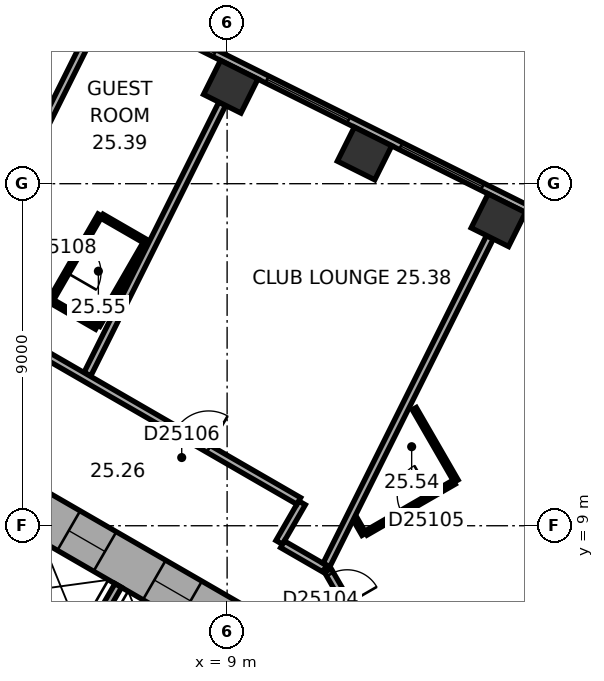
"""IFC4 building model, lengths in metres.
Left out: names, types, materials, properties, quantities, classifications, styles, units other than length and angle.
Written with IfcOpenShell. Run it as: python <this file> out.ifc"""

import sys

from ifc_helpers import new_model, si_unit, direction, frame, frame_2d, origin, origin_2d, place, context, subcontext, project, spatial, rectangle, extrude, element, fill, save


model = new_model("IFC4")
c1 = context("Model", 3, precision=1e-05, world=origin(), true_north=direction((0.0, 1.0)))
c2 = subcontext(c1, "Body", "Model", "MODEL_VIEW")
j1 = project(units=[si_unit("LENGTHUNIT", "METRE"), si_unit("PLANEANGLEUNIT", "RADIAN")], contexts=[c1])
p1 = place(None, origin())
s1 = spatial("IfcSite", under=j1, at=p1, CompositionType="ELEMENT")
p2 = place(p1, origin())
s2 = spatial("IfcBuilding", under=s1, at=p2, CompositionType="ELEMENT")
p3 = place(p2, frame((0.0, 0.0, 106.7)))
s3 = spatial("IfcBuildingStorey", under=s2, at=p3, CompositionType="ELEMENT", Elevation=106.7)
for number, where, z_axis, x_axis in (
    (1, (16.138, 17.04, 0.0), (0.0, 0.0, 1.0), (-0.895, 0.446, 0.0)),
    (2, (12.616, 18.795, 0.0), (0.0, 0.0, 1.0), (-0.895, 0.446, 0.0)),
    (3, (9.095, 20.551, 0.0), (0.0, 0.0, 1.0), (-0.895, 0.446, 0.0)),
):
    element("IfcColumn", number, at=place(p3, frame(where, z_axis=z_axis, x_axis=x_axis)), inside=s3, PredefinedType="COLUMN", context=c2, shape_type="SweptSolid", body=[
        extrude(rectangle(XDim=1.1, YDim=1.0, at=origin_2d()), origin(), (0.0, 0.0, 1.0), 3.3),
    ])
p4 = place(p3, frame((10.4, 5.658, 0.0), z_axis=(0.0, 0.0, 1.0), x_axis=(-0.866021384402, 0.500006961711, 0.0)))
e4 = element("IfcWall", 4, at=p4, inside=s3, PredefinedType="SHEAR", context=c2, shape_type="SweptSolid", body=[
    extrude(rectangle(XDim=12.355, YDim=1.2, at=frame_2d((6.178, 0.0))), origin(), (0.0, 0.0, 1.0), 3.3),
])
p5 = place(p4, frame((2.728, 0.0, 0.0)))
e5 = element("IfcOpeningElement", 5, at=p5, cuts=e4, PredefinedType="OPENING", context=c2, shape_type="SweptSolid", body=[
    extrude(rectangle(XDim=1.1, YDim=2.1, at=frame_2d((0.55, 1.05))), frame((0.0, 0.61, 0.0), z_axis=(0.0, -1.0, 0.0), x_axis=(1.0, 0.0, 0.0)), (0.0, 0.0, 1.0), 1.22),
])
p6 = place(p4, frame((5.328, 0.0, 0.0)))
e6 = element("IfcOpeningElement", 6, at=p6, cuts=e4, PredefinedType="OPENING", context=c2, shape_type="SweptSolid", body=[
    extrude(rectangle(XDim=1.1, YDim=2.1, at=frame_2d((0.55, 1.05))), frame((0.0, 0.61, 0.0), z_axis=(0.0, -1.0, 0.0), x_axis=(1.0, 0.0, 0.0)), (0.0, 0.0, 1.0), 1.22),
])
p7 = place(p4, frame((7.928, 0.0, 0.0)))
e7 = element("IfcOpeningElement", 7, at=p7, cuts=e4, PredefinedType="OPENING", context=c2, shape_type="SweptSolid", body=[
    extrude(rectangle(XDim=1.1, YDim=2.1, at=frame_2d((0.55, 1.05))), frame((0.0, 0.61, 0.0), z_axis=(0.0, -1.0, 0.0), x_axis=(1.0, 0.0, 0.0)), (0.0, 0.0, 1.0), 1.22),
])
p8 = place(p3, frame((20.63, 15.47, 0.0), z_axis=(0.0, 0.0, 1.0), x_axis=(-0.894934518609, 0.446197498203, 0.0)))
e8 = element("IfcWall", 8, at=p8, inside=s3, PredefinedType="STANDARD", context=c2, shape_type="SweptSolid", body=[
    extrude(rectangle(XDim=21.246, YDim=0.2, at=frame_2d((10.623, 0.0))), origin(), (0.0, 0.0, 1.0), 3.3),
])
p9 = place(p8, frame((1.553, 0.0, 0.8)))
e9 = element("IfcOpeningElement", 9, at=p9, cuts=e8, PredefinedType="OPENING", context=c2, shape_type="SweptSolid", body=[
    extrude(rectangle(XDim=2.4, YDim=1.7, at=frame_2d((1.2, 0.85))), frame((0.0, 0.11, 0.0), z_axis=(0.0, -1.0, 0.0), x_axis=(1.0, 0.0, 0.0)), (0.0, 0.0, 1.0), 0.22),
])
p10 = place(p8, frame((5.488, 0.0, 0.8)))
e10 = element("IfcOpeningElement", 10, at=p10, cuts=e8, PredefinedType="OPENING", context=c2, shape_type="SweptSolid", body=[
    extrude(rectangle(XDim=2.4, YDim=1.7, at=frame_2d((1.2, 0.85))), frame((0.0, 0.11, 0.0), z_axis=(0.0, -1.0, 0.0), x_axis=(1.0, 0.0, 0.0)), (0.0, 0.0, 1.0), 0.22),
])
p11 = place(p8, frame((9.422, 0.0, 0.8)))
e11 = element("IfcOpeningElement", 11, at=p11, cuts=e8, PredefinedType="OPENING", context=c2, shape_type="SweptSolid", body=[
    extrude(rectangle(XDim=2.4, YDim=1.7, at=frame_2d((1.2, 0.85))), frame((0.0, 0.11, 0.0), z_axis=(0.0, -1.0, 0.0), x_axis=(1.0, 0.0, 0.0)), (0.0, 0.0, 1.0), 0.22),
])
p12 = place(p8, frame((13.357, 0.0, 0.8)))
e12 = element("IfcOpeningElement", 12, at=p12, cuts=e8, PredefinedType="OPENING", context=c2, shape_type="SweptSolid", body=[
    extrude(rectangle(XDim=2.4, YDim=1.7, at=frame_2d((1.2, 0.85))), frame((0.0, 0.11, 0.0), z_axis=(0.0, -1.0, 0.0), x_axis=(1.0, 0.0, 0.0)), (0.0, 0.0, 1.0), 0.22),
])
p13 = place(p8, frame((17.292, 0.0, 0.8)))
e13 = element("IfcOpeningElement", 13, at=p13, cuts=e8, PredefinedType="OPENING", context=c2, shape_type="SweptSolid", body=[
    extrude(rectangle(XDim=2.4, YDim=1.7, at=frame_2d((1.2, 0.85))), frame((0.0, 0.11, 0.0), z_axis=(0.0, -1.0, 0.0), x_axis=(1.0, 0.0, 0.0)), (0.0, 0.0, 1.0), 0.22),
])
p14 = place(p3, frame((7.424, 4.259, 0.0), z_axis=(0.0, 0.0, 1.0), x_axis=(-0.866026010844, 0.49999894854, 0.0)))
e14 = element("IfcWall", 14, at=p14, inside=s3, PredefinedType="PARTITIONING", context=c2, shape_type="SweptSolid", body=[
    extrude(rectangle(XDim=8.0, YDim=0.2, at=frame_2d((4.0, 0.0))), origin(), (0.0, 0.0, 1.0), 3.05),
])
p15 = place(p3, frame((5.036, 5.522, 0.0), z_axis=(0.0, 0.0, 1.0), x_axis=(0.499946605688, 0.86605622881, 0.0)))
e15 = element("IfcWall", 15, at=p15, inside=s3, PredefinedType="PARTITIONING", context=c2, shape_type="SweptSolid", body=[
    extrude(rectangle(XDim=2.2, YDim=0.2, at=frame_2d((1.1, 0.0))), origin(), (0.0, 0.0, 1.0), 3.05),
])
p16 = place(p3, frame((6.303, 4.617, 0.0), z_axis=(0.0, 0.0, 1.0), x_axis=(-0.866027801685, 0.499995846692, 0.0)))
e16 = element("IfcWall", 16, at=p16, inside=s3, PredefinedType="SHEAR", context=c2, shape_type="SweptSolid", body=[
    extrude(rectangle(XDim=7.06, YDim=0.3, at=frame_2d((3.53, 0.0))), origin(), (0.0, 0.0, 1.0), 3.05),
])
p17 = place(p3, frame((4.356, 14.922, 0.0), z_axis=(0.0, 0.0, 1.0), x_axis=(0.499936506574, 0.866062058628, 0.0)))
e17 = element("IfcWall", 17, at=p17, inside=s3, PredefinedType="PARTITIONING", context=c2, shape_type="SweptSolid", body=[
    extrude(rectangle(XDim=2.6, YDim=0.12, at=frame_2d((1.3, 0.0))), origin(), (0.0, 0.0, 1.0), 3.05),
])
p18 = place(p17, frame((0.85, 0.0, 0.0)))
e18 = element("IfcOpeningElement", 18, at=p18, cuts=e17, PredefinedType="OPENING", context=c2, shape_type="SweptSolid", body=[
    extrude(rectangle(XDim=0.9, YDim=2.1, at=frame_2d((0.45, 1.05))), frame((0.0, 0.07, 0.0), z_axis=(0.0, -1.0, 0.0), x_axis=(1.0, 0.0, 0.0)), (0.0, 0.0, 1.0), 0.14),
])
p19 = place(p3, frame((5.351, 21.859, 0.0), z_axis=(0.0, 0.0, 1.0), x_axis=(-0.446205309328, -0.894930624086, 0.0)))
e19 = element("IfcWall", 19, at=p19, inside=s3, PredefinedType="PARTITIONING", context=c2, shape_type="SweptSolid", body=[
    extrude(rectangle(XDim=8.913, YDim=0.2, at=frame_2d((4.457, 0.0))), origin(), (0.0, 0.0, 1.0), 2.6),
])
p20 = place(p3, frame((5.569, 14.222, 0.0), z_axis=(0.0, 0.0, 1.0), x_axis=(-0.866036909293, 0.499980071345, 0.0)))
e20 = element("IfcWall", 20, at=p20, inside=s3, PredefinedType="PARTITIONING", context=c2, shape_type="SweptSolid", body=[
    extrude(rectangle(XDim=1.34, YDim=0.12, at=frame_2d((0.67, 0.0))), origin(), (0.0, 0.0, 1.0), 3.05),
])
p21 = place(p3, frame((5.708, 17.144, 0.0), z_axis=(0.0, 0.0, 1.0), x_axis=(0.866082447003, -0.499901185229, 0.0)))
e21 = element("IfcWall", 21, at=p21, inside=s3, PredefinedType="PARTITIONING", context=c2, shape_type="SweptSolid", body=[
    extrude(rectangle(XDim=1.34, YDim=0.12, at=frame_2d((0.67, 0.0))), origin(), (0.0, 0.0, 1.0), 3.05),
])
p22 = place(p3, frame((6.839, 16.422, 0.0), z_axis=(0.0, 0.0, 1.0), x_axis=(-0.50000366821, -0.866023285932, 0.0)))
e22 = element("IfcWall", 22, at=p22, inside=s3, PredefinedType="PARTITIONING", context=c2, shape_type="SweptSolid", body=[
    extrude(rectangle(XDim=2.48, YDim=0.12, at=frame_2d((1.24, 0.0))), origin(), (0.0, 0.0, 1.0), 3.05),
])
p23 = place(p3, frame((8.872, 20.104, 0.0), z_axis=(0.0, 0.0, 1.0), x_axis=(-0.446218378653, -0.894924107706, 0.0)))
e23 = element("IfcWall", 23, at=p23, inside=s3, PredefinedType="PARTITIONING", context=c2, shape_type="SweptSolid", body=[
    extrude(rectangle(XDim=7.95, YDim=0.2, at=frame_2d((3.975, 0.0))), origin(), (0.0, 0.0, 1.0), 3.05),
])
p24 = place(p3, frame((10.371, 8.561, 0.0), z_axis=(0.0, 0.0, 1.0), x_axis=(0.499986357472, 0.866033280158, 0.0)))
e24 = element("IfcWall", 24, at=p24, inside=s3, PredefinedType="PARTITIONING", context=c2, shape_type="SweptSolid", body=[
    extrude(rectangle(XDim=1.201, YDim=0.2, at=frame_2d((0.601, 0.0))), origin(), (0.0, 0.0, 1.0), 3.05),
])
p25 = place(p3, frame((10.885, 9.652, 0.0), z_axis=(0.0, 0.0, 1.0), x_axis=(-0.866033868542, 0.499985338323, 0.0)))
e25 = element("IfcWall", 25, at=p25, inside=s3, PredefinedType="PARTITIONING", context=c2, shape_type="SweptSolid", body=[
    extrude(rectangle(XDim=8.602, YDim=0.2, at=frame_2d((4.301, 0.0))), origin(), (0.0, 0.0, 1.0), 3.05),
])
p26 = place(p25, frame((2.739, 0.0, 0.0)))
e26 = element("IfcOpeningElement", 26, at=p26, cuts=e25, PredefinedType="OPENING", context=c2, shape_type="SweptSolid", body=[
    extrude(rectangle(XDim=1.0, YDim=2.1, at=frame_2d((0.5, 1.05))), frame((0.0, 0.11, 0.0), z_axis=(0.0, -1.0, 0.0), x_axis=(1.0, 0.0, 0.0)), (0.0, 0.0, 1.0), 0.22),
])
p27 = place(p3, frame((11.566, 7.871, 0.0), z_axis=(0.0, 0.0, 1.0), x_axis=(-0.866004557827, 0.500036104519, 0.0)))
e27 = element("IfcWall", 27, at=p27, inside=s3, PredefinedType="PARTITIONING", context=c2, shape_type="SweptSolid", body=[
    extrude(rectangle(XDim=1.28, YDim=0.2, at=frame_2d((0.64, 0.0))), origin(), (0.0, 0.0, 1.0), 3.05),
])
p28 = place(p3, frame((12.218, 6.839, 0.0), z_axis=(0.0, 0.0, 1.0), x_axis=(-0.500044870432, 0.865999496279, 0.0)))
e28 = element("IfcWall", 28, at=p28, inside=s3, PredefinedType="PARTITIONING", context=c2, shape_type="SweptSolid", body=[
    extrude(rectangle(XDim=1.136, YDim=0.2, at=frame_2d((0.568, 0.0))), origin(), (0.0, 0.0, 1.0), 3.05),
])
p29 = place(p28, frame((0.118, 0.0, 0.0)))
e29 = element("IfcOpeningElement", 29, at=p29, cuts=e28, PredefinedType="OPENING", context=c2, shape_type="SweptSolid", body=[
    extrude(rectangle(XDim=0.9, YDim=2.1, at=frame_2d((0.45, 1.05))), frame((0.0, 0.11, 0.0), z_axis=(0.0, -1.0, 0.0), x_axis=(1.0, 0.0, 0.0)), (0.0, 0.0, 1.0), 0.22),
])
p30 = place(p3, frame((12.601, 8.776, 0.0), z_axis=(0.0, 0.0, 1.0), x_axis=(-0.500166486798, 0.865929261247, 0.0)))
e30 = element("IfcWall", 30, at=p30, inside=s3, PredefinedType="PARTITIONING", context=c2, shape_type="SweptSolid", body=[
    extrude(rectangle(XDim=0.476, YDim=0.12, at=frame_2d((0.238, 0.0))), origin(), (0.0, 0.0, 1.0), 3.05),
])
p31 = place(p3, frame((13.926, 12.081, 0.0), z_axis=(0.0, 0.0, 1.0), x_axis=(0.499994660107, -0.866028486751, 0.0)))
e31 = element("IfcWall", 31, at=p31, inside=s3, PredefinedType="PARTITIONING", context=c2, shape_type="SweptSolid", body=[
    extrude(rectangle(XDim=2.2, YDim=0.12, at=frame_2d((1.1, 0.0))), origin(), (0.0, 0.0, 1.0), 3.05),
])
p32 = place(p3, frame((14.974, 10.146, 0.0), z_axis=(0.0, 0.0, 1.0), x_axis=(-0.86599746015, -0.500048396672, 0.0)))
e32 = element("IfcWall", 32, at=p32, inside=s3, PredefinedType="PARTITIONING", context=c2, shape_type="SweptSolid", body=[
    extrude(rectangle(XDim=2.68, YDim=0.12, at=frame_2d((1.34, 0.0))), origin(), (0.0, 0.0, 1.0), 3.05),
])
p33 = place(p32, frame((0.69, 0.0, 0.0)))
e33 = element("IfcOpeningElement", 33, at=p33, cuts=e32, PredefinedType="OPENING", context=c2, shape_type="SweptSolid", body=[
    extrude(rectangle(XDim=0.9, YDim=2.1, at=frame_2d((0.45, 1.05))), frame((0.0, 0.07, 0.0), z_axis=(0.0, -1.0, 0.0), x_axis=(1.0, 0.0, 0.0)), (0.0, 0.0, 1.0), 0.14),
])
p34 = place(p3, frame((15.915, 16.592, 0.0), z_axis=(0.0, 0.0, 1.0), x_axis=(-0.446199736347, -0.894933402709, 0.0)))
e34 = element("IfcWall", 34, at=p34, inside=s3, PredefinedType="PARTITIONING", context=c2, shape_type="SweptSolid", body=[
    extrude(rectangle(XDim=9.635, YDim=0.2, at=frame_2d((4.817, 0.0))), origin(), (0.0, 0.0, 1.0), 3.05),
])
p35 = place(p10, origin())
e35 = element("IfcWindow", 35, at=p35, inside=s3, PartitioningType="SINGLE_PANEL", PredefinedType="WINDOW", context=c2, shape_type="SweptSolid", body=[
    extrude(rectangle(XDim=2.4, YDim=1.7, at=frame_2d((1.2, 0.85))), frame((0.0, 0.03, 0.0), z_axis=(0.0, -1.0, 0.0), x_axis=(1.0, 0.0, 0.0)), (0.0, 0.0, 1.0), 0.06),
])
fill(e10, e35)
p36 = place(p11, origin())
e36 = element("IfcWindow", 36, at=p36, inside=s3, PartitioningType="SINGLE_PANEL", PredefinedType="WINDOW", context=c2, shape_type="SweptSolid", body=[
    extrude(rectangle(XDim=2.4, YDim=1.7, at=frame_2d((1.2, 0.85))), frame((0.0, 0.03, 0.0), z_axis=(0.0, -1.0, 0.0), x_axis=(1.0, 0.0, 0.0)), (0.0, 0.0, 1.0), 0.06),
])
fill(e11, e36)
p37 = place(p12, origin())
e37 = element("IfcWindow", 37, at=p37, inside=s3, PartitioningType="SINGLE_PANEL", PredefinedType="WINDOW", context=c2, shape_type="SweptSolid", body=[
    extrude(rectangle(XDim=2.4, YDim=1.7, at=frame_2d((1.2, 0.85))), frame((0.0, 0.03, 0.0), z_axis=(0.0, -1.0, 0.0), x_axis=(1.0, 0.0, 0.0)), (0.0, 0.0, 1.0), 0.06),
])
fill(e12, e37)
p38 = place(p5, origin())
e38 = element("IfcDoor", 38, at=p38, inside=s3, OperationType="DOUBLE_DOOR_SLIDING", PredefinedType="DOOR", context=c2, shape_type="SweptSolid", body=[
    extrude(rectangle(XDim=1.1, YDim=2.1, at=frame_2d((0.55, 1.05))), frame((0.0, 0.025, 0.0), z_axis=(0.0, -1.0, 0.0), x_axis=(1.0, 0.0, 0.0)), (0.0, 0.0, 1.0), 0.05),
])
fill(e5, e38)
p39 = place(p6, origin())
e39 = element("IfcDoor", 39, at=p39, inside=s3, OperationType="DOUBLE_DOOR_SLIDING", PredefinedType="DOOR", context=c2, shape_type="SweptSolid", body=[
    extrude(rectangle(XDim=1.1, YDim=2.1, at=frame_2d((0.55, 1.05))), frame((0.0, 0.025, 0.0), z_axis=(0.0, -1.0, 0.0), x_axis=(1.0, 0.0, 0.0)), (0.0, 0.0, 1.0), 0.05),
])
fill(e6, e39)
p40 = place(p29, origin())
e40 = element("IfcDoor", 40, at=p40, inside=s3, OperationType="SINGLE_SWING_LEFT", PredefinedType="DOOR", context=c2, shape_type="SweptSolid", body=[
    extrude(rectangle(XDim=0.9, YDim=2.1, at=frame_2d((0.45, 1.05))), frame((0.0, 0.025, 0.0), z_axis=(0.0, -1.0, 0.0), x_axis=(1.0, 0.0, 0.0)), (0.0, 0.0, 1.0), 0.05),
])
fill(e29, e40)
p41 = place(p33, origin())
e41 = element("IfcDoor", 41, at=p41, inside=s3, OperationType="SINGLE_SWING_LEFT", PredefinedType="DOOR", context=c2, shape_type="SweptSolid", body=[
    extrude(rectangle(XDim=0.9, YDim=2.1, at=frame_2d((0.45, 1.05))), frame((0.0, 0.025, 0.0), z_axis=(0.0, -1.0, 0.0), x_axis=(1.0, 0.0, 0.0)), (0.0, 0.0, 1.0), 0.05),
])
fill(e33, e41)
p42 = place(p26, origin())
e42 = element("IfcDoor", 42, at=p42, inside=s3, OperationType="SINGLE_SWING_LEFT", PredefinedType="DOOR", context=c2, shape_type="SweptSolid", body=[
    extrude(rectangle(XDim=1.0, YDim=2.1, at=frame_2d((0.5, 1.05))), frame((0.0, 0.025, 0.0), z_axis=(0.0, -1.0, 0.0), x_axis=(1.0, 0.0, 0.0)), (0.0, 0.0, 1.0), 0.05),
])
fill(e26, e42)
p43 = place(p18, origin())
e43 = element("IfcDoor", 43, at=p43, inside=s3, OperationType="SINGLE_SWING_LEFT", PredefinedType="DOOR", context=c2, shape_type="SweptSolid", body=[
    extrude(rectangle(XDim=0.9, YDim=2.1, at=frame_2d((0.45, 1.05))), frame((0.0, 0.025, 0.0), z_axis=(0.0, -1.0, 0.0), x_axis=(1.0, 0.0, 0.0)), (0.0, 0.0, 1.0), 0.05),
])
fill(e18, e43)
save(model, sys.argv[1])
